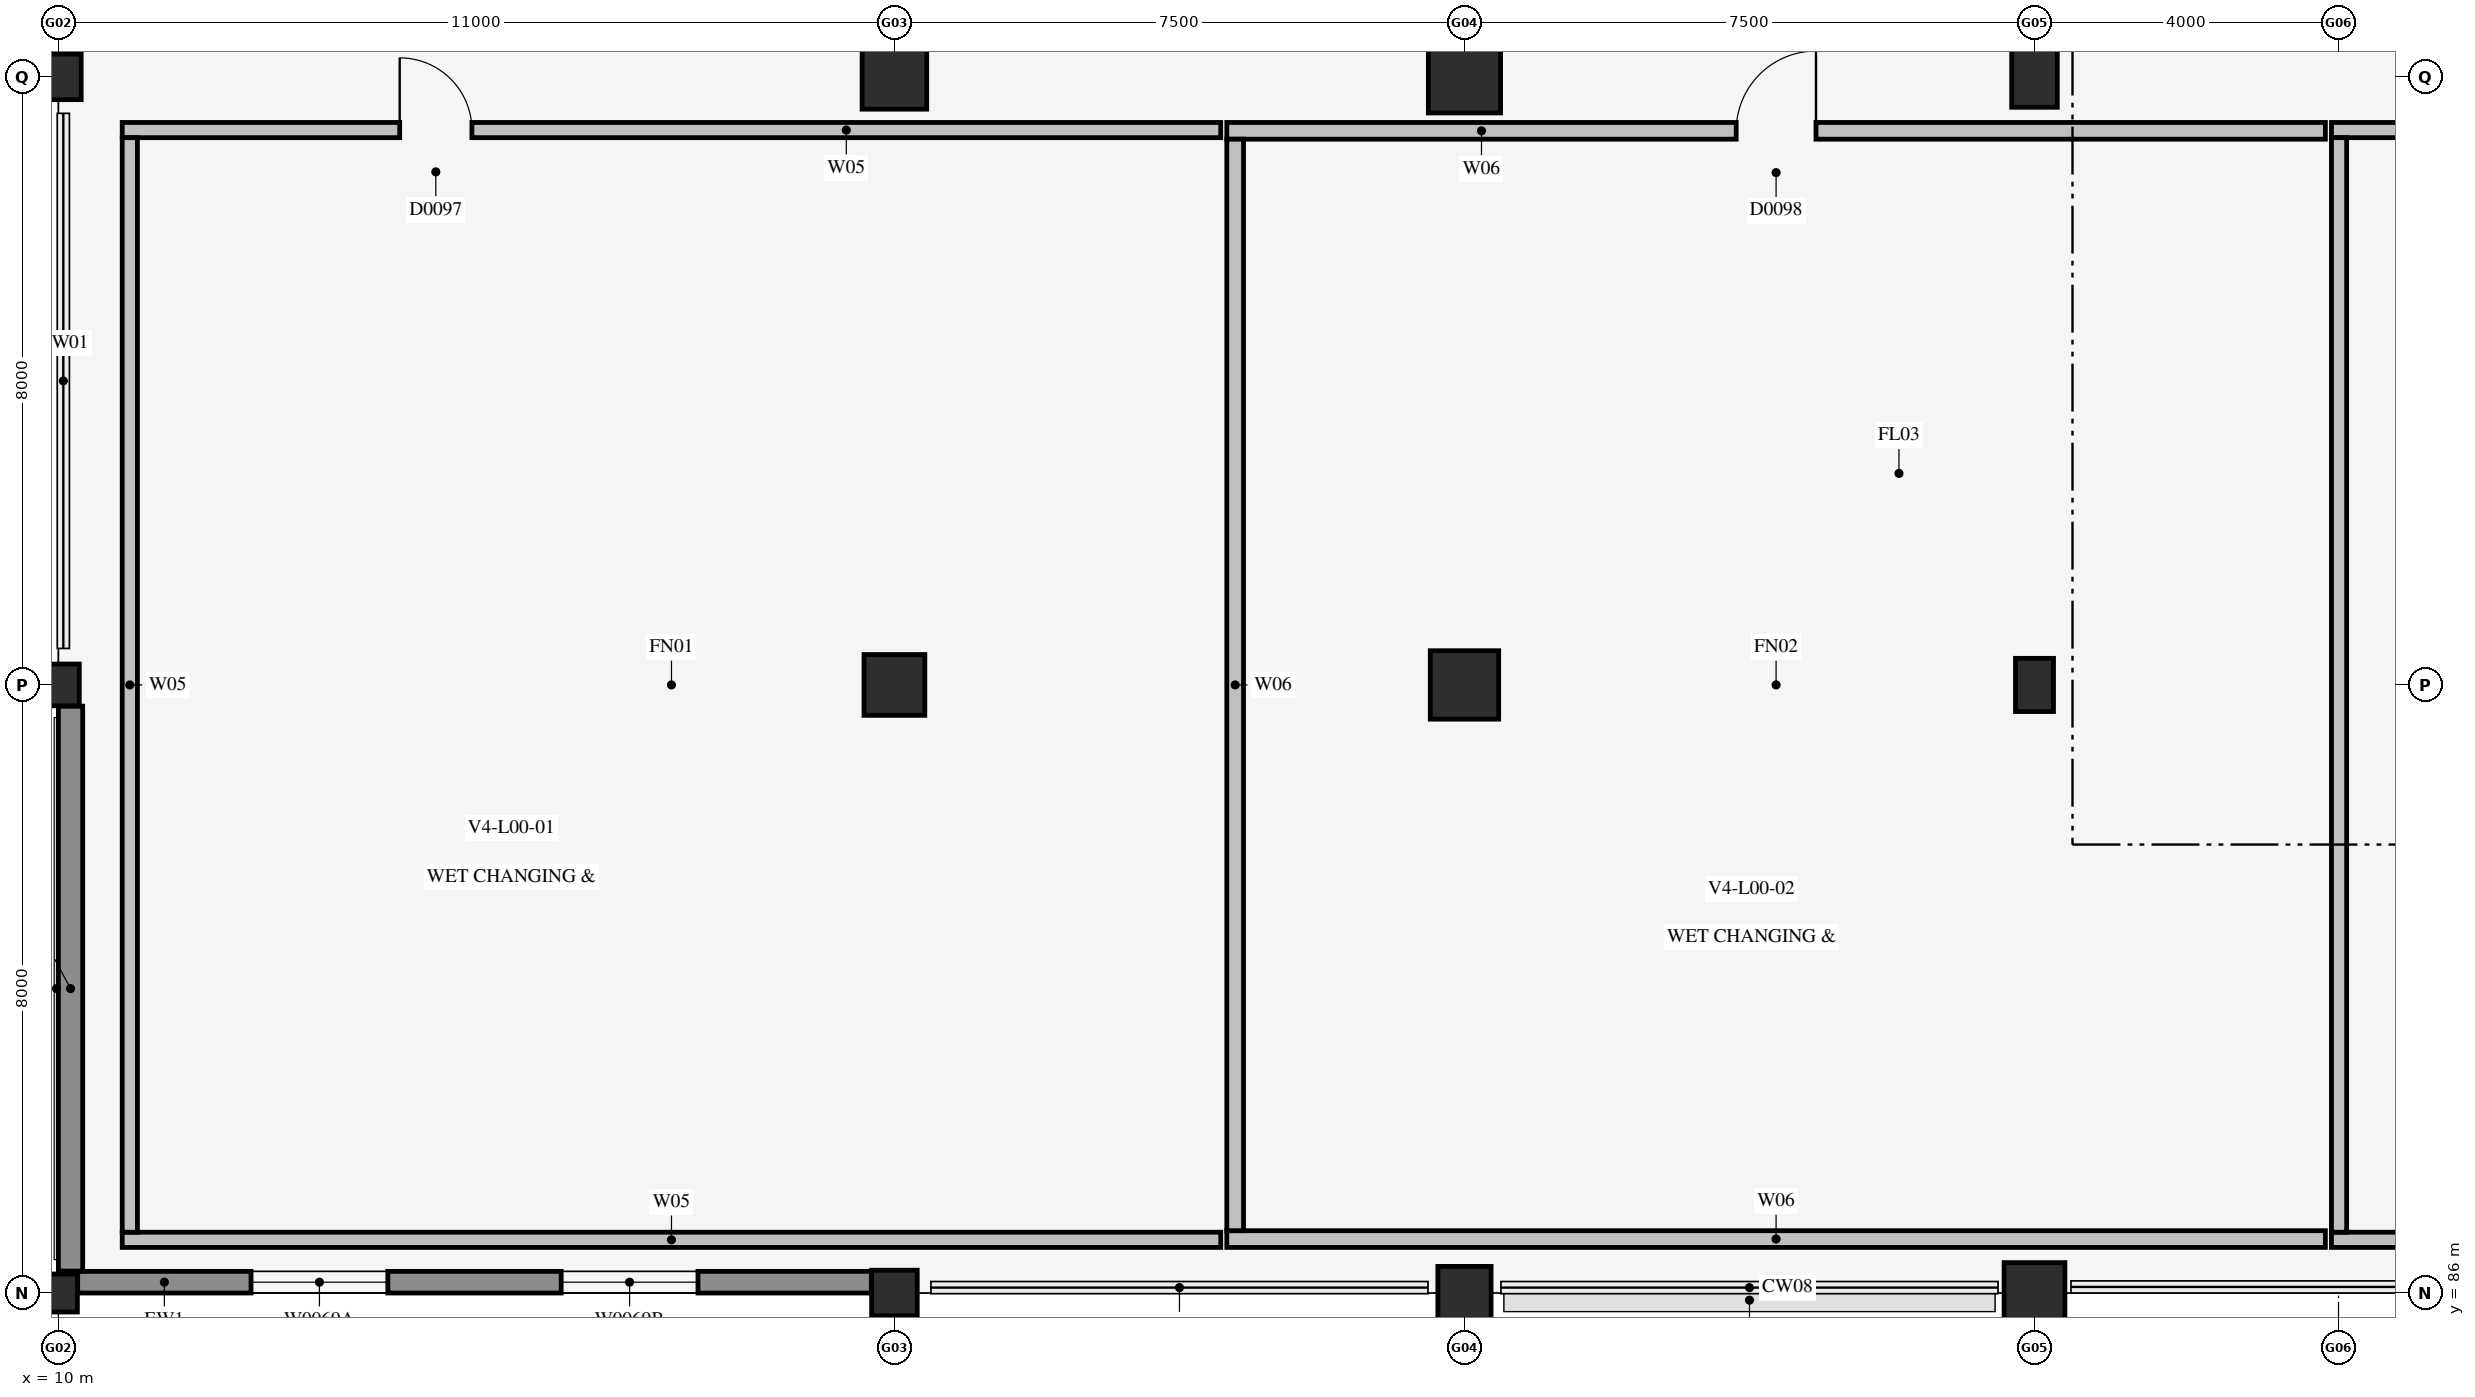
"""IFC4 building model, lengths in metres.
Left out: names, types, materials, properties, quantities, classifications, styles, units other than length and angle.
Written with IfcOpenShell. Run it as: python <this file> out.ifc"""

import sys

from ifc_helpers import new_model, si_unit, direction, frame, frame_2d, origin, origin_2d, place, context, subcontext, project, spatial, rectangle, extrude, element, fill, save


model = new_model("IFC4")
c1 = context("Model", 3, precision=1e-05, world=origin(), true_north=direction((0.0, 1.0)))
c2 = subcontext(c1, "Body", "Model", "MODEL_VIEW")
j1 = project(units=[si_unit("LENGTHUNIT", "METRE"), si_unit("PLANEANGLEUNIT", "RADIAN")], contexts=[c1])
p1 = place(None, origin())
s1 = spatial("IfcSite", under=j1, at=p1, CompositionType="ELEMENT")
p2 = place(p1, origin())
s2 = spatial("IfcBuilding", under=s1, at=p2, CompositionType="ELEMENT")
p3 = place(p2, origin())
s3 = spatial("IfcBuildingStorey", under=s2, at=p3, CompositionType="ELEMENT", Elevation=0.0)
p4 = place(p3, frame((10.0, 86.0, 0.0), z_axis=(0.0, 0.0, 1.0), x_axis=(1.0, 0.0, 0.0)))
e1 = element("IfcColumn", 1, at=p4, inside=s3, PredefinedType="COLUMN", context=c2, shape_type="SweptSolid", body=[
    extrude(rectangle(XDim=0.5, YDim=0.5, at=origin_2d()), origin(), (0.0, 0.0, 1.0), 5.4),
])
p5 = place(p3, frame((10.0, 94.0, 0.0), z_axis=(0.0, 0.0, 1.0), x_axis=(1.0, 0.0, 0.0)))
e2 = element("IfcColumn", 2, at=p5, inside=s3, PredefinedType="COLUMN", context=c2, shape_type="SweptSolid", body=[
    extrude(rectangle(XDim=0.55, YDim=0.55, at=origin_2d()), origin(), (0.0, 0.0, 1.0), 5.4),
])
for number, where, z_axis, x_axis in (
    (3, (10.0, 102.0, 0.0), (0.0, 0.0, 1.0), (1.0, 0.0, 0.0)),
    (4, (21.0, 86.0, 0.0), (0.0, 0.0, 1.0), (1.0, 0.0, 0.0)),
):
    element("IfcColumn", number, at=place(p3, frame(where, z_axis=z_axis, x_axis=x_axis)), inside=s3, PredefinedType="COLUMN", context=c2, shape_type="SweptSolid", body=[
        extrude(rectangle(XDim=0.6, YDim=0.6, at=origin_2d()), origin(), (0.0, 0.0, 1.0), 5.4),
    ])
p6 = place(p3, frame((21.0, 94.0, 0.0), z_axis=(0.0, 0.0, 1.0), x_axis=(1.0, 0.0, 0.0)))
e5 = element("IfcColumn", 5, at=p6, inside=s3, PredefinedType="COLUMN", context=c2, shape_type="SweptSolid", body=[
    extrude(rectangle(XDim=0.8, YDim=0.8, at=origin_2d()), origin(), (0.0, 0.0, 1.0), 5.4),
])
p7 = place(p3, frame((21.0, 102.0, 0.0), z_axis=(0.0, 0.0, 1.0), x_axis=(1.0, 0.0, 0.0)))
e6 = element("IfcColumn", 6, at=p7, inside=s3, PredefinedType="COLUMN", context=c2, shape_type="SweptSolid", body=[
    extrude(rectangle(XDim=0.85, YDim=0.85, at=origin_2d()), origin(), (0.0, 0.0, 1.0), 5.4),
])
p8 = place(p3, frame((28.5, 86.0, 0.0), z_axis=(0.0, 0.0, 1.0), x_axis=(1.0, 0.0, 0.0)))
e7 = element("IfcColumn", 7, at=p8, inside=s3, PredefinedType="COLUMN", context=c2, shape_type="SweptSolid", body=[
    extrude(rectangle(XDim=0.7, YDim=0.7, at=origin_2d()), origin(), (0.0, 0.0, 1.0), 5.4),
])
p9 = place(p3, frame((28.5, 94.0, 0.0), z_axis=(0.0, 0.0, 1.0), x_axis=(1.0, 0.0, 0.0)))
e8 = element("IfcColumn", 8, at=p9, inside=s3, PredefinedType="COLUMN", context=c2, shape_type="SweptSolid", body=[
    extrude(rectangle(XDim=0.9, YDim=0.9, at=origin_2d()), origin(), (0.0, 0.0, 1.0), 5.4),
])
p10 = place(p3, frame((28.5, 102.0, 0.0), z_axis=(0.0, 0.0, 1.0), x_axis=(1.0, 0.0, 0.0)))
e9 = element("IfcColumn", 9, at=p10, inside=s3, PredefinedType="COLUMN", context=c2, shape_type="SweptSolid", body=[
    extrude(rectangle(XDim=0.95, YDim=0.95, at=origin_2d()), origin(), (0.0, 0.0, 1.0), 5.4),
])
p11 = place(p3, frame((36.0, 86.0, 0.0), z_axis=(0.0, 0.0, 1.0), x_axis=(1.0, 0.0, 0.0)))
e10 = element("IfcColumn", 10, at=p11, inside=s3, PredefinedType="COLUMN", context=c2, shape_type="SweptSolid", body=[
    extrude(rectangle(XDim=0.8, YDim=0.8, at=origin_2d()), origin(), (0.0, 0.0, 1.0), 5.4),
])
p12 = place(p3, frame((36.0, 94.0, 0.0), z_axis=(0.0, 0.0, 1.0), x_axis=(1.0, 0.0, 0.0)))
e11 = element("IfcColumn", 11, at=p12, inside=s3, PredefinedType="COLUMN", context=c2, shape_type="SweptSolid", body=[
    extrude(rectangle(XDim=0.5, YDim=0.7, at=origin_2d()), origin(), (0.0, 0.0, 1.0), 5.4),
])
p13 = place(p3, frame((36.0, 102.0, 0.0), z_axis=(0.0, 0.0, 1.0), x_axis=(1.0, 0.0, 0.0)))
e12 = element("IfcColumn", 12, at=p13, inside=s3, PredefinedType="COLUMN", context=c2, shape_type="SweptSolid", body=[
    extrude(rectangle(XDim=0.6, YDim=0.8, at=origin_2d()), origin(), (0.0, 0.0, 1.0), 5.4),
])
p14 = place(p3, frame((10.84, 86.7, 0.0), z_axis=(0.0, 0.0, 1.0), x_axis=(1.0, 0.0, 0.0)))
e13 = element("IfcWall", 13, at=p14, inside=s3, PredefinedType="PLUMBINGWALL", context=c2, shape_type="SweptSolid", body=[
    extrude(rectangle(XDim=14.453, YDim=0.2, at=frame_2d((7.227, 0.0))), origin(), (0.0, 0.0, 1.0), 5.145),
])
p15 = place(p3, frame((10.84, 101.3, 0.0), z_axis=(0.0, 0.0, 1.0), x_axis=(1.0, 0.0, 0.0)))
e14 = element("IfcWall", 14, at=p15, inside=s3, PredefinedType="PLUMBINGWALL", context=c2, shape_type="SweptSolid", body=[
    extrude(rectangle(XDim=14.453, YDim=0.2, at=frame_2d((7.227, 0.0))), origin(), (0.0, 0.0, 1.0), 5.145),
])
p16 = place(p15, frame((3.651, 0.0, 0.0)))
e15 = element("IfcOpeningElement", 15, at=p16, cuts=e14, PredefinedType="OPENING", context=c2, shape_type="SweptSolid", body=[
    extrude(rectangle(XDim=0.95, YDim=2.15, at=frame_2d((0.475, 1.075))), frame((0.0, 0.112, 0.0), z_axis=(0.0, -1.0, 0.0), x_axis=(1.0, 0.0, 0.0)), (0.0, 0.0, 1.0), 0.224),
])
p17 = place(p3, frame((10.94, 86.8, 0.0), z_axis=(0.0, 0.0, 1.0), x_axis=(0.0, 1.0, 0.0)))
e16 = element("IfcWall", 16, at=p17, inside=s3, PredefinedType="PLUMBINGWALL", context=c2, shape_type="SweptSolid", body=[
    extrude(rectangle(XDim=14.4, YDim=0.2, at=frame_2d((7.2, 0.0))), origin(), (0.0, 0.0, 1.0), 5.145),
])
p18 = place(p3, frame((25.373, 86.71, 0.0), z_axis=(0.0, 0.0, 1.0), x_axis=(1.0, 0.0, 0.0)))
e17 = element("IfcWall", 17, at=p18, inside=s3, PredefinedType="PLUMBINGWALL", context=c2, shape_type="SweptSolid", body=[
    extrude(rectangle(XDim=14.454, YDim=0.22, at=frame_2d((7.227, 0.0))), origin(), (0.0, 0.0, 1.0), 5.145),
])
p19 = place(p3, frame((25.373, 101.29, 0.0), z_axis=(0.0, 0.0, 1.0), x_axis=(1.0, 0.0, 0.0)))
e18 = element("IfcWall", 18, at=p19, inside=s3, PredefinedType="PLUMBINGWALL", context=c2, shape_type="SweptSolid", body=[
    extrude(rectangle(XDim=14.454, YDim=0.22, at=frame_2d((7.227, 0.0))), origin(), (0.0, 0.0, 1.0), 5.145),
])
p20 = place(p19, frame((6.702, 0.0, 0.0)))
e19 = element("IfcOpeningElement", 19, at=p20, cuts=e18, PredefinedType="OPENING", context=c2, shape_type="SweptSolid", body=[
    extrude(rectangle(XDim=1.05, YDim=2.15, at=frame_2d((0.525, 1.075))), frame((0.0, 0.122, 0.0), z_axis=(0.0, -1.0, 0.0), x_axis=(1.0, 0.0, 0.0)), (0.0, 0.0, 1.0), 0.244),
])
p21 = place(p3, frame((25.483, 86.82, 0.0), z_axis=(0.0, 0.0, 1.0), x_axis=(0.0, 1.0, 0.0)))
e20 = element("IfcWall", 20, at=p21, inside=s3, PredefinedType="PLUMBINGWALL", context=c2, shape_type="SweptSolid", body=[
    extrude(rectangle(XDim=14.36, YDim=0.22, at=frame_2d((7.18, 0.0))), origin(), (0.0, 0.0, 1.0), 5.145),
])
p22 = place(p3, frame((39.907, 86.7, 0.0), z_axis=(0.0, 0.0, 1.0), x_axis=(1.0, 0.0, 0.0)))
e21 = element("IfcWall", 21, at=p22, inside=s3, PredefinedType="PLUMBINGWALL", context=c2, shape_type="SweptSolid", body=[
    extrude(rectangle(XDim=14.453, YDim=0.2, at=frame_2d((7.227, 0.0))), origin(), (0.0, 0.0, 1.0), 5.145),
])
p23 = place(p3, frame((39.907, 101.3, 0.0), z_axis=(0.0, 0.0, 1.0), x_axis=(1.0, 0.0, 0.0)))
e22 = element("IfcWall", 22, at=p23, inside=s3, PredefinedType="PLUMBINGWALL", context=c2, shape_type="SweptSolid", body=[
    extrude(rectangle(XDim=14.453, YDim=0.2, at=frame_2d((7.227, 0.0))), origin(), (0.0, 0.0, 1.0), 5.145),
])
p24 = place(p23, frame((9.89, 0.0, 0.0)))
e23 = element("IfcOpeningElement", 23, at=p24, cuts=e22, PredefinedType="OPENING", context=c2, shape_type="SweptSolid", body=[
    extrude(rectangle(XDim=0.9, YDim=2.1, at=frame_2d((0.45, 1.05))), frame((0.0, 0.112, 0.0), z_axis=(0.0, -1.0, 0.0), x_axis=(1.0, 0.0, 0.0)), (0.0, 0.0, 1.0), 0.224),
])
p25 = place(p3, frame((40.007, 86.8, 0.0), z_axis=(0.0, 0.0, 1.0), x_axis=(0.0, 1.0, 0.0)))
e24 = element("IfcWall", 24, at=p25, inside=s3, PredefinedType="PLUMBINGWALL", context=c2, shape_type="SweptSolid", body=[
    extrude(rectangle(XDim=14.4, YDim=0.2, at=frame_2d((7.2, 0.0))), origin(), (0.0, 0.0, 1.0), 5.145),
])
p26 = place(p3, frame((10.254, 86.143, 0.0), z_axis=(0.0, 0.0, 1.0), x_axis=(1.0, 0.0, 0.0)))
e25 = element("IfcWall", 25, at=p26, inside=s3, PredefinedType="SOLIDWALL", context=c2, shape_type="SweptSolid", body=[
    extrude(rectangle(XDim=10.442, YDim=0.285, at=frame_2d((5.221, 0.0))), origin(), (0.0, 0.0, 1.0), 4.67),
])
p27 = place(p26, frame((2.281, 0.0, 0.95)))
e26 = element("IfcOpeningElement", 26, at=p27, cuts=e25, PredefinedType="OPENING", context=c2, shape_type="SweptSolid", body=[
    extrude(rectangle(XDim=1.8, YDim=1.5, at=frame_2d((0.9, 0.75))), frame((0.0, 0.154, 0.0), z_axis=(0.0, -1.0, 0.0), x_axis=(1.0, 0.0, 0.0)), (0.0, 0.0, 1.0), 0.309),
])
p28 = place(p26, frame((6.361, 0.0, 0.95)))
e27 = element("IfcOpeningElement", 27, at=p28, cuts=e25, PredefinedType="OPENING", context=c2, shape_type="SweptSolid", body=[
    extrude(rectangle(XDim=1.8, YDim=1.5, at=frame_2d((0.9, 0.75))), frame((0.0, 0.154, 0.0), z_axis=(0.0, -1.0, 0.0), x_axis=(1.0, 0.0, 0.0)), (0.0, 0.0, 1.0), 0.309),
])
p29 = place(p3, frame((10.16, 86.289, 0.0), z_axis=(0.0, 0.0, 1.0), x_axis=(0.0, 1.0, 0.0)))
e28 = element("IfcWall", 28, at=p29, inside=s3, PredefinedType="SOLIDWALL", context=c2, shape_type="SweptSolid", body=[
    extrude(rectangle(XDim=7.432, YDim=0.32, at=frame_2d((3.716, 0.0))), origin(), (0.0, 0.0, 1.0), 4.594),
])
p30 = place(p16, frame((0.95, 0.0, 0.0), z_axis=(0.0, 0.0, 1.0), x_axis=(-1.0, 0.0, 0.0)))
e29 = element("IfcDoor", 29, at=p30, inside=s3, OperationType="SINGLE_SWING_LEFT", PredefinedType="DOOR", context=c2, shape_type="SweptSolid", body=[
    extrude(rectangle(XDim=0.95, YDim=2.15, at=frame_2d((0.475, 1.075))), frame((0.0, 0.025, 0.0), z_axis=(0.0, -1.0, 0.0), x_axis=(1.0, 0.0, 0.0)), (0.0, 0.0, 1.0), 0.05),
])
fill(e15, e29)
p31 = place(p20, frame((1.05, 0.0, 0.0), z_axis=(0.0, 0.0, 1.0), x_axis=(-1.0, 0.0, 0.0)))
e30 = element("IfcDoor", 30, at=p31, inside=s3, OperationType="SINGLE_SWING_RIGHT", PredefinedType="DOOR", context=c2, shape_type="SweptSolid", body=[
    extrude(rectangle(XDim=1.05, YDim=2.15, at=frame_2d((0.525, 1.075))), frame((0.0, 0.025, 0.0), z_axis=(0.0, -1.0, 0.0), x_axis=(1.0, 0.0, 0.0)), (0.0, 0.0, 1.0), 0.05),
])
fill(e19, e30)
p32 = place(p27, origin())
e31 = element("IfcWindow", 31, at=p32, inside=s3, PartitioningType="SINGLE_PANEL", PredefinedType="WINDOW", context=c2, shape_type="SweptSolid", body=[
    extrude(rectangle(XDim=1.8, YDim=1.5, at=frame_2d((0.9, 0.75))), frame((0.0, 0.03, 0.0), z_axis=(0.0, -1.0, 0.0), x_axis=(1.0, 0.0, 0.0)), (0.0, 0.0, 1.0), 0.06),
])
fill(e26, e31)
p33 = place(p28, origin())
e32 = element("IfcWindow", 32, at=p33, inside=s3, PartitioningType="SINGLE_PANEL", PredefinedType="WINDOW", context=c2, shape_type="SweptSolid", body=[
    extrude(rectangle(XDim=1.8, YDim=1.5, at=frame_2d((0.9, 0.75))), frame((0.0, 0.03, 0.0), z_axis=(0.0, -1.0, 0.0), x_axis=(1.0, 0.0, 0.0)), (0.0, 0.0, 1.0), 0.06),
])
fill(e27, e32)
save(model, sys.argv[1])
